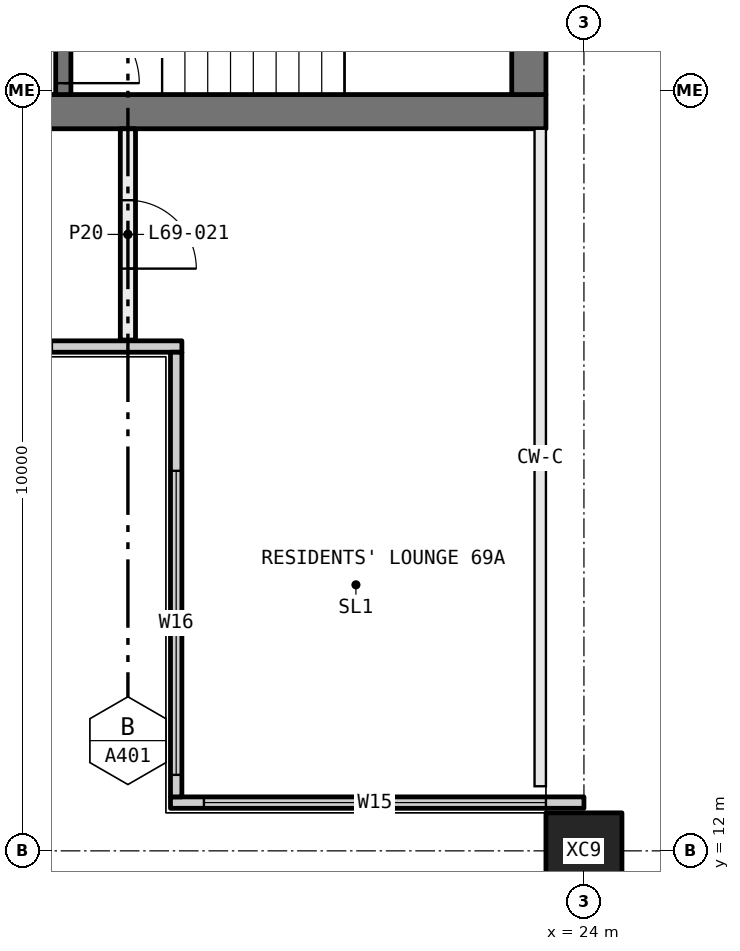
"""IFC4 building model, lengths in metres.
Left out: names, types, materials, properties, quantities, classifications, styles, units other than length and angle.
Written with IfcOpenShell. Run it as: python <this file> out.ifc"""

import sys

from ifc_helpers import new_model, si_unit, direction, frame, frame_2d, origin, origin_2d, place, context, subcontext, project, spatial, rectangle, hollow_rectangle, extrude, element, fill, save


model = new_model("IFC4")
c1 = context("Model", 3, precision=1e-05, world=origin(), true_north=direction((0.0, 1.0)))
c2 = subcontext(c1, "Body", "Model", "MODEL_VIEW")
j1 = project(units=[si_unit("LENGTHUNIT", "METRE"), si_unit("PLANEANGLEUNIT", "RADIAN")], contexts=[c1])
p1 = place(None, origin())
s1 = spatial("IfcSite", under=j1, at=p1, CompositionType="ELEMENT")
p2 = place(p1, origin())
s2 = spatial("IfcBuilding", under=s1, at=p2, CompositionType="ELEMENT")
p3 = place(p2, frame((0.0, 0.0, 255.9)))
s3 = spatial("IfcBuildingStorey", under=s2, at=p3, CompositionType="ELEMENT", Elevation=255.9)
p4 = place(p3, frame((24.0, 12.0, -0.4), z_axis=(0.0, 0.0, 1.0), x_axis=(1.0, 0.0, 0.0)))
e1 = element("IfcColumn", 1, at=p4, inside=s3, PredefinedType="COLUMN", context=c2, shape_type="SweptSolid", body=[
    extrude(hollow_rectangle(XDim=1.0, YDim=1.0, WallThickness=0.036, at=origin_2d()), origin(), (0.0, 0.0, 1.0), 3.45),
])
p5 = place(p3, frame((18.56, 12.635, 0.0), z_axis=(0.0, 0.0, 1.0), x_axis=(1.0, 0.0, 0.0)))
e2 = element("IfcWall", 2, at=p5, inside=s3, PredefinedType="ELEMENTEDWALL", context=c2, shape_type="SweptSolid", body=[
    extrude(rectangle(XDim=5.44, YDim=0.15, at=frame_2d((2.72, 0.0))), origin(), (0.0, 0.0, 1.0), 3.05),
])
p6 = place(p5, frame((0.44, 0.0, 0.45)))
e3 = element("IfcOpeningElement", 3, at=p6, cuts=e2, PredefinedType="OPENING", context=c2, shape_type="SweptSolid", body=[
    extrude(rectangle(XDim=4.5, YDim=2.55, at=frame_2d((2.25, 1.275))), frame((0.0, 0.085, 0.0), z_axis=(0.0, -1.0, 0.0), x_axis=(1.0, 0.0, 0.0)), (0.0, 0.0, 1.0), 0.17),
])
p7 = place(p3, frame((12.56, 18.635, 0.0), z_axis=(0.0, 0.0, 1.0), x_axis=(1.0, 0.0, 0.0)))
e4 = element("IfcWall", 4, at=p7, inside=s3, PredefinedType="ELEMENTEDWALL", context=c2, shape_type="SweptSolid", body=[
    extrude(rectangle(XDim=6.15, YDim=0.15, at=frame_2d((3.075, 0.0))), origin(), (0.0, 0.0, 1.0), 3.05),
])
p8 = place(p7, frame((0.44, 0.0, 0.45)))
e5 = element("IfcOpeningElement", 5, at=p8, cuts=e4, PredefinedType="OPENING", context=c2, shape_type="SweptSolid", body=[
    extrude(rectangle(XDim=4.0, YDim=2.55, at=frame_2d((2.0, 1.275))), frame((0.0, 0.085, 0.0), z_axis=(0.0, -1.0, 0.0), x_axis=(1.0, 0.0, 0.0)), (0.0, 0.0, 1.0), 0.17),
])
p9 = place(p3, frame((18.635, 12.71, 0.0), z_axis=(0.0, 0.0, 1.0), x_axis=(0.0, 1.0, 0.0)))
e6 = element("IfcWall", 6, at=p9, inside=s3, PredefinedType="ELEMENTEDWALL", context=c2, shape_type="SweptSolid", body=[
    extrude(rectangle(XDim=5.85, YDim=0.15, at=frame_2d((2.925, 0.0))), origin(), (0.0, 0.0, 1.0), 3.05),
])
p10 = place(p9, frame((0.29, 0.0, 0.45)))
e7 = element("IfcOpeningElement", 7, at=p10, cuts=e6, PredefinedType="OPENING", context=c2, shape_type="SweptSolid", body=[
    extrude(rectangle(XDim=4.0, YDim=2.55, at=frame_2d((2.0, 1.275))), frame((0.0, 0.085, 0.0), z_axis=(0.0, -1.0, 0.0), x_axis=(1.0, 0.0, 0.0)), (0.0, 0.0, 1.0), 0.17),
])
p11 = place(p3, frame((18.0, 21.5, 0.0), z_axis=(0.0, 0.0, 1.0), x_axis=(0.0, -1.0, 0.0)))
e8 = element("IfcWall", 8, at=p11, inside=s3, PredefinedType="PARTITIONING", context=c2, shape_type="SweptSolid", body=[
    extrude(rectangle(XDim=2.78, YDim=0.2, at=frame_2d((1.39, 0.0))), origin(), (0.0, 0.0, 1.0), 3.05),
])
p12 = place(p11, frame((0.94, 0.0, 0.0)))
e9 = element("IfcOpeningElement", 9, at=p12, cuts=e8, PredefinedType="OPENING", context=c2, shape_type="SweptSolid", body=[
    extrude(rectangle(XDim=0.9, YDim=2.1, at=frame_2d((0.45, 1.05))), frame((0.0, 0.11, 0.0), z_axis=(0.0, -1.0, 0.0), x_axis=(1.0, 0.0, 0.0)), (0.0, 0.0, 1.0), 0.22),
])
p13 = place(p3, frame((12.5, 21.725, 0.0), z_axis=(0.0, 0.0, 1.0), x_axis=(1.0, 0.0, 0.0)))
e10 = element("IfcWall", 10, at=p13, inside=s3, PredefinedType="SHEAR", context=c2, shape_type="SweptSolid", body=[
    extrude(rectangle(XDim=11.0, YDim=0.45, at=frame_2d((5.5, 0.0))), origin(), (0.0, 0.0, 1.0), 3.05),
])
p14 = place(p13, frame((1.125, 0.0, 0.0)))
e11 = element("IfcOpeningElement", 11, at=p14, cuts=e10, PredefinedType="OPENING", context=c2, shape_type="SweptSolid", body=[
    extrude(rectangle(XDim=1.0, YDim=2.1, at=frame_2d((0.5, 1.05))), frame((0.0, 0.235, 0.0), z_axis=(0.0, -1.0, 0.0), x_axis=(1.0, 0.0, 0.0)), (0.0, 0.0, 1.0), 0.47),
])
p15 = place(p3, frame((23.275, 21.95, 0.0), z_axis=(0.0, 0.0, 1.0), x_axis=(0.0, 1.0, 0.0)))
e12 = element("IfcWall", 12, at=p15, inside=s3, PredefinedType="SHEAR", context=c2, shape_type="SweptSolid", body=[
    extrude(rectangle(XDim=16.1, YDim=0.45, at=frame_2d((8.05, 0.0))), origin(), (0.0, 0.0, 1.0), 3.05),
])
p16 = place(p3, frame((17.15, 21.95, 0.0), z_axis=(0.0, 0.0, 1.0), x_axis=(0.0, 1.0, 0.0)))
e13 = element("IfcWall", 13, at=p16, inside=s3, PredefinedType="SOLIDWALL", context=c2, shape_type="SweptSolid", body=[
    extrude(rectangle(XDim=2.95, YDim=0.2, at=frame_2d((1.475, 0.0))), origin(), (0.0, 0.0, 1.0), 3.05),
])
p17 = place(p16, frame((0.15, 0.0, 0.0)))
e14 = element("IfcOpeningElement", 14, at=p17, cuts=e13, PredefinedType="OPENING", context=c2, shape_type="SweptSolid", body=[
    extrude(rectangle(XDim=1.0, YDim=2.1, at=frame_2d((0.5, 1.05))), frame((0.0, 0.11, 0.0), z_axis=(0.0, -1.0, 0.0), x_axis=(1.0, 0.0, 0.0)), (0.0, 0.0, 1.0), 0.22),
])
p18 = place(p6, origin())
e15 = element("IfcWindow", 15, at=p18, inside=s3, PartitioningType="SINGLE_PANEL", PredefinedType="WINDOW", context=c2, shape_type="SweptSolid", body=[
    extrude(rectangle(XDim=4.5, YDim=2.55, at=frame_2d((2.25, 1.275))), frame((0.0, 0.03, 0.0), z_axis=(0.0, -1.0, 0.0), x_axis=(1.0, 0.0, 0.0)), (0.0, 0.0, 1.0), 0.06),
])
fill(e3, e15)
p19 = place(p10, origin())
e16 = element("IfcWindow", 16, at=p19, inside=s3, PartitioningType="SINGLE_PANEL", PredefinedType="WINDOW", context=c2, shape_type="SweptSolid", body=[
    extrude(rectangle(XDim=4.0, YDim=2.55, at=frame_2d((2.0, 1.275))), frame((0.0, 0.03, 0.0), z_axis=(0.0, -1.0, 0.0), x_axis=(1.0, 0.0, 0.0)), (0.0, 0.0, 1.0), 0.06),
])
fill(e7, e16)
p20 = place(p12, origin())
e17 = element("IfcDoor", 17, at=p20, inside=s3, OperationType="SINGLE_SWING_LEFT", PredefinedType="DOOR", context=c2, shape_type="SweptSolid", body=[
    extrude(rectangle(XDim=0.9, YDim=2.1, at=frame_2d((0.45, 1.05))), frame((0.0, 0.025, 0.0), z_axis=(0.0, -1.0, 0.0), x_axis=(1.0, 0.0, 0.0)), (0.0, 0.0, 1.0), 0.05),
])
fill(e9, e17)
p21 = place(p17, frame((1.0, 0.0, 0.0), x_axis=(-1.0, 0.0, 0.0)))
e18 = element("IfcDoor", 18, at=p21, inside=s3, OperationType="SINGLE_SWING_LEFT", PredefinedType="DOOR", context=c2, shape_type="SweptSolid", body=[
    extrude(rectangle(XDim=1.0, YDim=2.1, at=frame_2d((0.5, 1.05))), frame((0.0, 0.025, 0.0), z_axis=(0.0, -1.0, 0.0), x_axis=(1.0, 0.0, 0.0)), (0.0, 0.0, 1.0), 0.05),
])
fill(e14, e18)
save(model, sys.argv[1])
